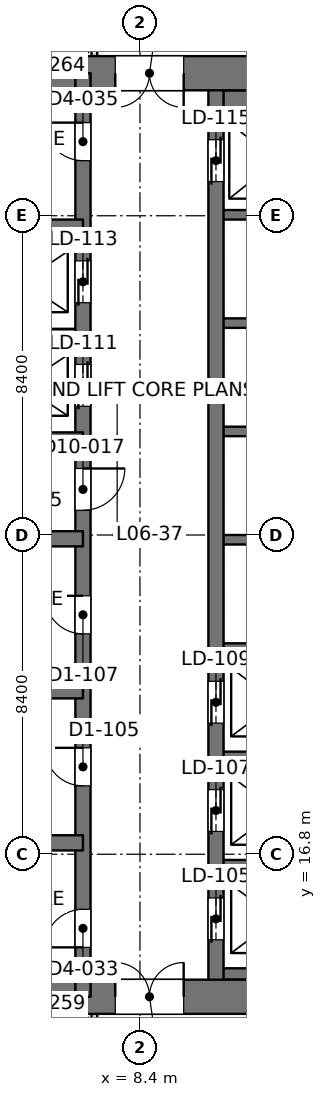
"""IFC4 building model, lengths in metres.
Left out: names, types, materials, properties, quantities, classifications, styles, units other than length and angle.
Written with IfcOpenShell. Run it as: python <this file> out.ifc"""

import sys

from ifc_helpers import new_model, si_unit, direction, frame, frame_2d, origin, place, context, subcontext, project, spatial, rectangle, extrude, element, fill, save


model = new_model("IFC4")
c1 = context("Model", 3, precision=1e-05, world=origin(), true_north=direction((0.0, 1.0)))
c2 = subcontext(c1, "Body", "Model", "MODEL_VIEW")
j1 = project(units=[si_unit("LENGTHUNIT", "METRE"), si_unit("PLANEANGLEUNIT", "RADIAN")], contexts=[c1])
p1 = place(None, origin())
s1 = spatial("IfcSite", under=j1, at=p1, CompositionType="ELEMENT")
p2 = place(p1, origin())
s2 = spatial("IfcBuilding", under=s1, at=p2, CompositionType="ELEMENT")
p3 = place(p2, frame((0.0, 0.0, 27.9)))
s3 = spatial("IfcBuildingStorey", under=s2, at=p3, CompositionType="ELEMENT", Elevation=27.9)
p4 = place(p3, frame((-1.2, 13.05, 0.0), z_axis=(0.0, 0.0, 1.0), x_axis=(1.0, 0.0, 0.0)))
e1 = element("IfcWall", 1, at=p4, inside=s3, PredefinedType="SHEAR", context=c2, shape_type="SweptSolid", body=[
    extrude(rectangle(XDim=18.0, YDim=0.9, at=frame_2d((9.0, 0.0))), origin(), (0.0, 0.0, 1.0), 4.5),
])
p5 = place(p4, frame((8.95, 0.0, 0.0)))
e2 = element("IfcOpeningElement", 2, at=p5, cuts=e1, PredefinedType="OPENING", context=c2, shape_type="SweptSolid", body=[
    extrude(rectangle(XDim=1.8, YDim=2.4, at=frame_2d((0.9, 1.2))), frame((0.0, 0.46, 0.0), z_axis=(0.0, -1.0, 0.0), x_axis=(1.0, 0.0, 0.0)), (0.0, 0.0, 1.0), 0.92),
])
p6 = place(p3, frame((-1.2, 37.35, 0.0), z_axis=(0.0, 0.0, 1.0), x_axis=(1.0, 0.0, 0.0)))
e3 = element("IfcWall", 3, at=p6, inside=s3, PredefinedType="SHEAR", context=c2, shape_type="SweptSolid", body=[
    extrude(rectangle(XDim=18.0, YDim=0.9, at=frame_2d((9.0, 0.0))), origin(), (0.0, 0.0, 1.0), 4.5),
])
p7 = place(p6, frame((8.95, 0.0, 0.0)))
e4 = element("IfcOpeningElement", 4, at=p7, cuts=e3, PredefinedType="OPENING", context=c2, shape_type="SweptSolid", body=[
    extrude(rectangle(XDim=1.8, YDim=2.4, at=frame_2d((0.9, 1.2))), frame((0.0, 0.46, 0.0), z_axis=(0.0, -1.0, 0.0), x_axis=(1.0, 0.0, 0.0)), (0.0, 0.0, 1.0), 0.92),
])
p8 = place(p3, frame((6.9, 13.05, 0.0), z_axis=(0.0, 0.0, 1.0), x_axis=(0.0, 1.0, 0.0)))
e5 = element("IfcWall", 5, at=p8, inside=s3, PredefinedType="SHEAR", context=c2, shape_type="SweptSolid", body=[
    extrude(rectangle(XDim=24.3, YDim=0.4, at=frame_2d((12.15, 0.0))), origin(), (0.0, 0.0, 1.0), 4.5),
])
p9 = place(p8, frame((1.3, 0.0, 0.0)))
e6 = element("IfcOpeningElement", 6, at=p9, cuts=e5, PredefinedType="OPENING", context=c2, shape_type="SweptSolid", body=[
    extrude(rectangle(XDim=1.0, YDim=2.2, at=frame_2d((0.5, 1.1))), frame((0.0, 0.21, 0.0), z_axis=(0.0, -1.0, 0.0), x_axis=(1.0, 0.0, 0.0)), (0.0, 0.0, 1.0), 0.42),
])
p10 = place(p8, frame((22.0, 0.0, 0.0)))
e7 = element("IfcOpeningElement", 7, at=p10, cuts=e5, PredefinedType="OPENING", context=c2, shape_type="SweptSolid", body=[
    extrude(rectangle(XDim=1.0, YDim=2.2, at=frame_2d((0.5, 1.1))), frame((0.0, 0.21, 0.0), z_axis=(0.0, -1.0, 0.0), x_axis=(1.0, 0.0, 0.0)), (0.0, 0.0, 1.0), 0.42),
])
p11 = place(p8, frame((5.55, 0.0, 0.0)))
e8 = element("IfcOpeningElement", 8, at=p11, cuts=e5, PredefinedType="OPENING", context=c2, shape_type="SweptSolid", body=[
    extrude(rectangle(XDim=1.0, YDim=2.2, at=frame_2d((0.5, 1.1))), frame((0.0, 0.21, 0.0), z_axis=(0.0, -1.0, 0.0), x_axis=(1.0, 0.0, 0.0)), (0.0, 0.0, 1.0), 0.42),
])
p12 = place(p8, frame((9.55, 0.0, 0.0)))
e9 = element("IfcOpeningElement", 9, at=p12, cuts=e5, PredefinedType="OPENING", context=c2, shape_type="SweptSolid", body=[
    extrude(rectangle(XDim=1.0, YDim=2.2, at=frame_2d((0.5, 1.1))), frame((0.0, 0.21, 0.0), z_axis=(0.0, -1.0, 0.0), x_axis=(1.0, 0.0, 0.0)), (0.0, 0.0, 1.0), 0.42),
])
p13 = place(p8, frame((12.8, 0.0, 0.0)))
e10 = element("IfcOpeningElement", 10, at=p13, cuts=e5, PredefinedType="OPENING", context=c2, shape_type="SweptSolid", body=[
    extrude(rectangle(XDim=1.1, YDim=2.2, at=frame_2d((0.55, 1.1))), frame((0.0, 0.21, 0.0), z_axis=(0.0, -1.0, 0.0), x_axis=(1.0, 0.0, 0.0)), (0.0, 0.0, 1.0), 0.42),
])
p14 = place(p8, frame((15.538, 0.0, 0.0)))
e11 = element("IfcOpeningElement", 11, at=p14, cuts=e5, PredefinedType="OPENING", context=c2, shape_type="SweptSolid", body=[
    extrude(rectangle(XDim=1.1, YDim=2.2, at=frame_2d((0.55, 1.1))), frame((0.0, 0.21, 0.0), z_axis=(0.0, -1.0, 0.0), x_axis=(1.0, 0.0, 0.0)), (0.0, 0.0, 1.0), 0.42),
])
p15 = place(p8, frame((18.262, 0.0, 0.0)))
e12 = element("IfcOpeningElement", 12, at=p15, cuts=e5, PredefinedType="OPENING", context=c2, shape_type="SweptSolid", body=[
    extrude(rectangle(XDim=1.1, YDim=2.2, at=frame_2d((0.55, 1.1))), frame((0.0, 0.21, 0.0), z_axis=(0.0, -1.0, 0.0), x_axis=(1.0, 0.0, 0.0)), (0.0, 0.0, 1.0), 0.42),
])
p16 = place(p3, frame((10.4, 13.05, 0.0), z_axis=(0.0, 0.0, 1.0), x_axis=(0.0, 1.0, 0.0)))
e13 = element("IfcWall", 13, at=p16, inside=s3, PredefinedType="SHEAR", context=c2, shape_type="SweptSolid", body=[
    extrude(rectangle(XDim=24.3, YDim=0.4, at=frame_2d((12.15, 0.0))), origin(), (0.0, 0.0, 1.0), 4.5),
])
p17 = place(p16, frame((1.5, 0.0, 0.0)))
e14 = element("IfcOpeningElement", 14, at=p17, cuts=e13, PredefinedType="OPENING", context=c2, shape_type="SweptSolid", body=[
    extrude(rectangle(XDim=1.1, YDim=2.2, at=frame_2d((0.55, 1.1))), frame((0.0, 0.21, 0.0), z_axis=(0.0, -1.0, 0.0), x_axis=(1.0, 0.0, 0.0)), (0.0, 0.0, 1.0), 0.42),
])
p18 = place(p16, frame((4.35, 0.0, 0.0)))
e15 = element("IfcOpeningElement", 15, at=p18, cuts=e13, PredefinedType="OPENING", context=c2, shape_type="SweptSolid", body=[
    extrude(rectangle(XDim=1.1, YDim=2.2, at=frame_2d((0.55, 1.1))), frame((0.0, 0.21, 0.0), z_axis=(0.0, -1.0, 0.0), x_axis=(1.0, 0.0, 0.0)), (0.0, 0.0, 1.0), 0.42),
])
p19 = place(p16, frame((7.2, 0.0, 0.0)))
e16 = element("IfcOpeningElement", 16, at=p19, cuts=e13, PredefinedType="OPENING", context=c2, shape_type="SweptSolid", body=[
    extrude(rectangle(XDim=1.1, YDim=2.2, at=frame_2d((0.55, 1.1))), frame((0.0, 0.21, 0.0), z_axis=(0.0, -1.0, 0.0), x_axis=(1.0, 0.0, 0.0)), (0.0, 0.0, 1.0), 0.42),
])
p20 = place(p16, frame((21.45, 0.0, 0.0)))
e17 = element("IfcOpeningElement", 17, at=p20, cuts=e13, PredefinedType="OPENING", context=c2, shape_type="SweptSolid", body=[
    extrude(rectangle(XDim=1.1, YDim=2.2, at=frame_2d((0.55, 1.1))), frame((0.0, 0.21, 0.0), z_axis=(0.0, -1.0, 0.0), x_axis=(1.0, 0.0, 0.0)), (0.0, 0.0, 1.0), 0.42),
])
for number, where, z_axis, x_axis in (
    (18, (-0.75, 17.1, 0.0), (0.0, 0.0, 1.0), (1.0, 0.0, 0.0)),
    (19, (-0.75, 21.1, 0.0), (0.0, 0.0, 1.0), (1.0, 0.0, 0.0)),
    (20, (-0.75, 25.1, 0.0), (0.0, 0.0, 1.0), (1.0, 0.0, 0.0)),
    (21, (-0.75, 27.7, 0.0), (0.0, 0.0, 1.0), (1.0, 0.0, 0.0)),
    (22, (-0.75, 33.3, 0.0), (0.0, 0.0, 1.0), (1.0, 0.0, 0.0)),
):
    element("IfcWall", number, at=place(p3, frame(where, z_axis=z_axis, x_axis=x_axis)), inside=s3, PredefinedType="SHEAR", context=c2, shape_type="SweptSolid", body=[
        extrude(rectangle(XDim=7.65, YDim=0.4, at=frame_2d((3.825, 0.0))), origin(), (0.0, 0.0, 1.0), 4.5),
    ])
p21 = place(p3, frame((3.7, 30.5, 0.0), z_axis=(0.0, 0.0, 1.0), x_axis=(1.0, 0.0, 0.0)))
e23 = element("IfcWall", 23, at=p21, inside=s3, PredefinedType="SHEAR", context=c2, shape_type="SweptSolid", body=[
    extrude(rectangle(XDim=3.2, YDim=0.25, at=frame_2d((1.6, 0.0))), origin(), (0.0, 0.0, 1.0), 4.5),
])
p22 = place(p3, frame((10.4, 13.65, 0.0), z_axis=(0.0, 0.0, 1.0), x_axis=(1.0, 0.0, 0.0)))
e24 = element("IfcWall", 24, at=p22, inside=s3, PredefinedType="SHEAR", context=c2, shape_type="SweptSolid", body=[
    extrude(rectangle(XDim=3.2, YDim=0.3, at=frame_2d((1.6, 0.0))), origin(), (0.0, 0.0, 1.0), 4.5),
])
for number, where, z_axis, x_axis in (
    (25, (10.4, 16.525, 0.0), (0.0, 0.0, 1.0), (1.0, 0.0, 0.0)),
    (26, (10.4, 19.375, 0.0), (0.0, 0.0, 1.0), (1.0, 0.0, 0.0)),
    (27, (10.4, 22.225, 0.0), (0.0, 0.0, 1.0), (1.0, 0.0, 0.0)),
    (28, (10.4, 25.075, 0.0), (0.0, 0.0, 1.0), (1.0, 0.0, 0.0)),
    (29, (10.4, 27.925, 0.0), (0.0, 0.0, 1.0), (1.0, 0.0, 0.0)),
    (30, (10.4, 30.775, 0.0), (0.0, 0.0, 1.0), (1.0, 0.0, 0.0)),
    (31, (10.4, 33.625, 0.0), (0.0, 0.0, 1.0), (1.0, 0.0, 0.0)),
):
    element("IfcWall", number, at=place(p3, frame(where, z_axis=z_axis, x_axis=x_axis)), inside=s3, PredefinedType="SHEAR", context=c2, shape_type="SweptSolid", body=[
        extrude(rectangle(XDim=3.2, YDim=0.25, at=frame_2d((1.6, 0.0))), origin(), (0.0, 0.0, 1.0), 4.5),
    ])
p23 = place(p3, frame((10.4, 36.625, 0.0), z_axis=(0.0, 0.0, 1.0), x_axis=(1.0, 0.0, 0.0)))
e32 = element("IfcWall", 32, at=p23, inside=s3, PredefinedType="SHEAR", context=c2, shape_type="SweptSolid", body=[
    extrude(rectangle(XDim=3.2, YDim=0.55, at=frame_2d((1.6, 0.0))), origin(), (0.0, 0.0, 1.0), 4.5),
])
p24 = place(p3, frame((7.2, 10.874, 0.0), z_axis=(0.0, 0.0, 1.0), x_axis=(0.0, 1.0, 0.0)))
e33 = element("IfcWall", 33, at=p24, inside=s3, PredefinedType="PARTITIONING", context=c2, shape_type="SweptSolid", body=[
    extrude(rectangle(XDim=1.728, YDim=0.15, at=frame_2d((0.864, 0.0))), origin(), (0.0, 0.0, 1.0), 4.34),
])
p25 = place(p24, frame((0.326, 0.0, 0.0)))
e34 = element("IfcOpeningElement", 34, at=p25, cuts=e33, PredefinedType="OPENING", context=c2, shape_type="SweptSolid", body=[
    extrude(rectangle(XDim=1.0, YDim=2.2, at=frame_2d((0.5, 1.1))), frame((0.0, 0.085, 0.0), z_axis=(0.0, -1.0, 0.0), x_axis=(1.0, 0.0, 0.0)), (0.0, 0.0, 1.0), 0.17),
])
p26 = place(p3, frame((7.2, 37.8, 0.0), z_axis=(0.0, 0.0, 1.0), x_axis=(0.0, 1.0, 0.0)))
e35 = element("IfcWall", 35, at=p26, inside=s3, PredefinedType="PARTITIONING", context=c2, shape_type="SweptSolid", body=[
    extrude(rectangle(XDim=1.726, YDim=0.15, at=frame_2d((0.863, 0.0))), origin(), (0.0, 0.0, 1.0), 4.34),
])
p27 = place(p26, frame((0.4, 0.0, 0.0)))
e36 = element("IfcOpeningElement", 36, at=p27, cuts=e35, PredefinedType="OPENING", context=c2, shape_type="SweptSolid", body=[
    extrude(rectangle(XDim=1.0, YDim=2.2, at=frame_2d((0.5, 1.1))), frame((0.0, 0.085, 0.0), z_axis=(0.0, -1.0, 0.0), x_axis=(1.0, 0.0, 0.0)), (0.0, 0.0, 1.0), 0.17),
])
p28 = place(p5, origin())
e37 = element("IfcDoor", 37, at=p28, inside=s3, OperationType="DOUBLE_DOOR_SINGLE_SWING", PredefinedType="DOOR", context=c2, shape_type="SweptSolid", body=[
    extrude(rectangle(XDim=1.8, YDim=2.4, at=frame_2d((0.9, 1.2))), frame((0.0, 0.025, 0.0), z_axis=(0.0, -1.0, 0.0), x_axis=(1.0, 0.0, 0.0)), (0.0, 0.0, 1.0), 0.05),
])
fill(e2, e37)
p29 = place(p7, frame((1.8, 0.0, 0.0), z_axis=(0.0, 0.0, 1.0), x_axis=(-1.0, 0.0, 0.0)))
e38 = element("IfcDoor", 38, at=p29, inside=s3, OperationType="DOUBLE_DOOR_SINGLE_SWING", PredefinedType="DOOR", context=c2, shape_type="SweptSolid", body=[
    extrude(rectangle(XDim=1.8, YDim=2.4, at=frame_2d((0.9, 1.2))), frame((0.0, 0.025, 0.0), z_axis=(0.0, -1.0, 0.0), x_axis=(1.0, 0.0, 0.0)), (0.0, 0.0, 1.0), 0.05),
])
fill(e4, e38)
p30 = place(p9, origin())
e39 = element("IfcDoor", 39, at=p30, inside=s3, OperationType="SINGLE_SWING_LEFT", PredefinedType="DOOR", context=c2, shape_type="SweptSolid", body=[
    extrude(rectangle(XDim=1.0, YDim=2.2, at=frame_2d((0.5, 1.1))), frame((0.0, 0.025, 0.0), z_axis=(0.0, -1.0, 0.0), x_axis=(1.0, 0.0, 0.0)), (0.0, 0.0, 1.0), 0.05),
])
fill(e6, e39)
p31 = place(p10, origin())
e40 = element("IfcDoor", 40, at=p31, inside=s3, OperationType="SINGLE_SWING_RIGHT", PredefinedType="DOOR", context=c2, shape_type="SweptSolid", body=[
    extrude(rectangle(XDim=1.0, YDim=2.2, at=frame_2d((0.5, 1.1))), frame((0.0, 0.025, 0.0), z_axis=(0.0, -1.0, 0.0), x_axis=(1.0, 0.0, 0.0)), (0.0, 0.0, 1.0), 0.05),
])
fill(e7, e40)
p32 = place(p11, origin())
e41 = element("IfcDoor", 41, at=p32, inside=s3, OperationType="SINGLE_SWING_RIGHT", PredefinedType="DOOR", context=c2, shape_type="SweptSolid", body=[
    extrude(rectangle(XDim=1.0, YDim=2.2, at=frame_2d((0.5, 1.1))), frame((0.0, 0.025, 0.0), z_axis=(0.0, -1.0, 0.0), x_axis=(1.0, 0.0, 0.0)), (0.0, 0.0, 1.0), 0.05),
])
fill(e8, e41)
p33 = place(p12, origin())
e42 = element("IfcDoor", 42, at=p33, inside=s3, OperationType="SINGLE_SWING_RIGHT", PredefinedType="DOOR", context=c2, shape_type="SweptSolid", body=[
    extrude(rectangle(XDim=1.0, YDim=2.2, at=frame_2d((0.5, 1.1))), frame((0.0, 0.025, 0.0), z_axis=(0.0, -1.0, 0.0), x_axis=(1.0, 0.0, 0.0)), (0.0, 0.0, 1.0), 0.05),
])
fill(e9, e42)
p34 = place(p13, frame((1.1, 0.0, 0.0), z_axis=(0.0, 0.0, 1.0), x_axis=(-1.0, 0.0, 0.0)))
e43 = element("IfcDoor", 43, at=p34, inside=s3, OperationType="SINGLE_SWING_LEFT", PredefinedType="DOOR", context=c2, shape_type="SweptSolid", body=[
    extrude(rectangle(XDim=1.1, YDim=2.2, at=frame_2d((0.55, 1.1))), frame((0.0, 0.025, 0.0), z_axis=(0.0, -1.0, 0.0), x_axis=(1.0, 0.0, 0.0)), (0.0, 0.0, 1.0), 0.05),
])
fill(e10, e43)
p35 = place(p17, origin())
e44 = element("IfcDoor", 44, at=p35, inside=s3, OperationType="DOUBLE_DOOR_SLIDING", PredefinedType="DOOR", context=c2, shape_type="SweptSolid", body=[
    extrude(rectangle(XDim=1.1, YDim=2.2, at=frame_2d((0.55, 1.1))), frame((0.0, 0.025, 0.0), z_axis=(0.0, -1.0, 0.0), x_axis=(1.0, 0.0, 0.0)), (0.0, 0.0, 1.0), 0.05),
])
fill(e14, e44)
p36 = place(p18, origin())
e45 = element("IfcDoor", 45, at=p36, inside=s3, OperationType="DOUBLE_DOOR_SLIDING", PredefinedType="DOOR", context=c2, shape_type="SweptSolid", body=[
    extrude(rectangle(XDim=1.1, YDim=2.2, at=frame_2d((0.55, 1.1))), frame((0.0, 0.025, 0.0), z_axis=(0.0, -1.0, 0.0), x_axis=(1.0, 0.0, 0.0)), (0.0, 0.0, 1.0), 0.05),
])
fill(e15, e45)
p37 = place(p19, origin())
e46 = element("IfcDoor", 46, at=p37, inside=s3, OperationType="DOUBLE_DOOR_SLIDING", PredefinedType="DOOR", context=c2, shape_type="SweptSolid", body=[
    extrude(rectangle(XDim=1.1, YDim=2.2, at=frame_2d((0.55, 1.1))), frame((0.0, 0.025, 0.0), z_axis=(0.0, -1.0, 0.0), x_axis=(1.0, 0.0, 0.0)), (0.0, 0.0, 1.0), 0.05),
])
fill(e16, e46)
p38 = place(p20, origin())
e47 = element("IfcDoor", 47, at=p38, inside=s3, OperationType="DOUBLE_DOOR_SLIDING", PredefinedType="DOOR", context=c2, shape_type="SweptSolid", body=[
    extrude(rectangle(XDim=1.1, YDim=2.2, at=frame_2d((0.55, 1.1))), frame((0.0, 0.025, 0.0), z_axis=(0.0, -1.0, 0.0), x_axis=(1.0, 0.0, 0.0)), (0.0, 0.0, 1.0), 0.05),
])
fill(e17, e47)
p39 = place(p14, origin())
e48 = element("IfcDoor", 48, at=p39, inside=s3, OperationType="DOUBLE_DOOR_SLIDING", PredefinedType="DOOR", context=c2, shape_type="SweptSolid", body=[
    extrude(rectangle(XDim=1.1, YDim=2.2, at=frame_2d((0.55, 1.1))), frame((0.0, 0.025, 0.0), z_axis=(0.0, -1.0, 0.0), x_axis=(1.0, 0.0, 0.0)), (0.0, 0.0, 1.0), 0.05),
])
fill(e11, e48)
p40 = place(p15, origin())
e49 = element("IfcDoor", 49, at=p40, inside=s3, OperationType="DOUBLE_DOOR_SLIDING", PredefinedType="DOOR", context=c2, shape_type="SweptSolid", body=[
    extrude(rectangle(XDim=1.1, YDim=2.2, at=frame_2d((0.55, 1.1))), frame((0.0, 0.025, 0.0), z_axis=(0.0, -1.0, 0.0), x_axis=(1.0, 0.0, 0.0)), (0.0, 0.0, 1.0), 0.05),
])
fill(e12, e49)
save(model, sys.argv[1])
